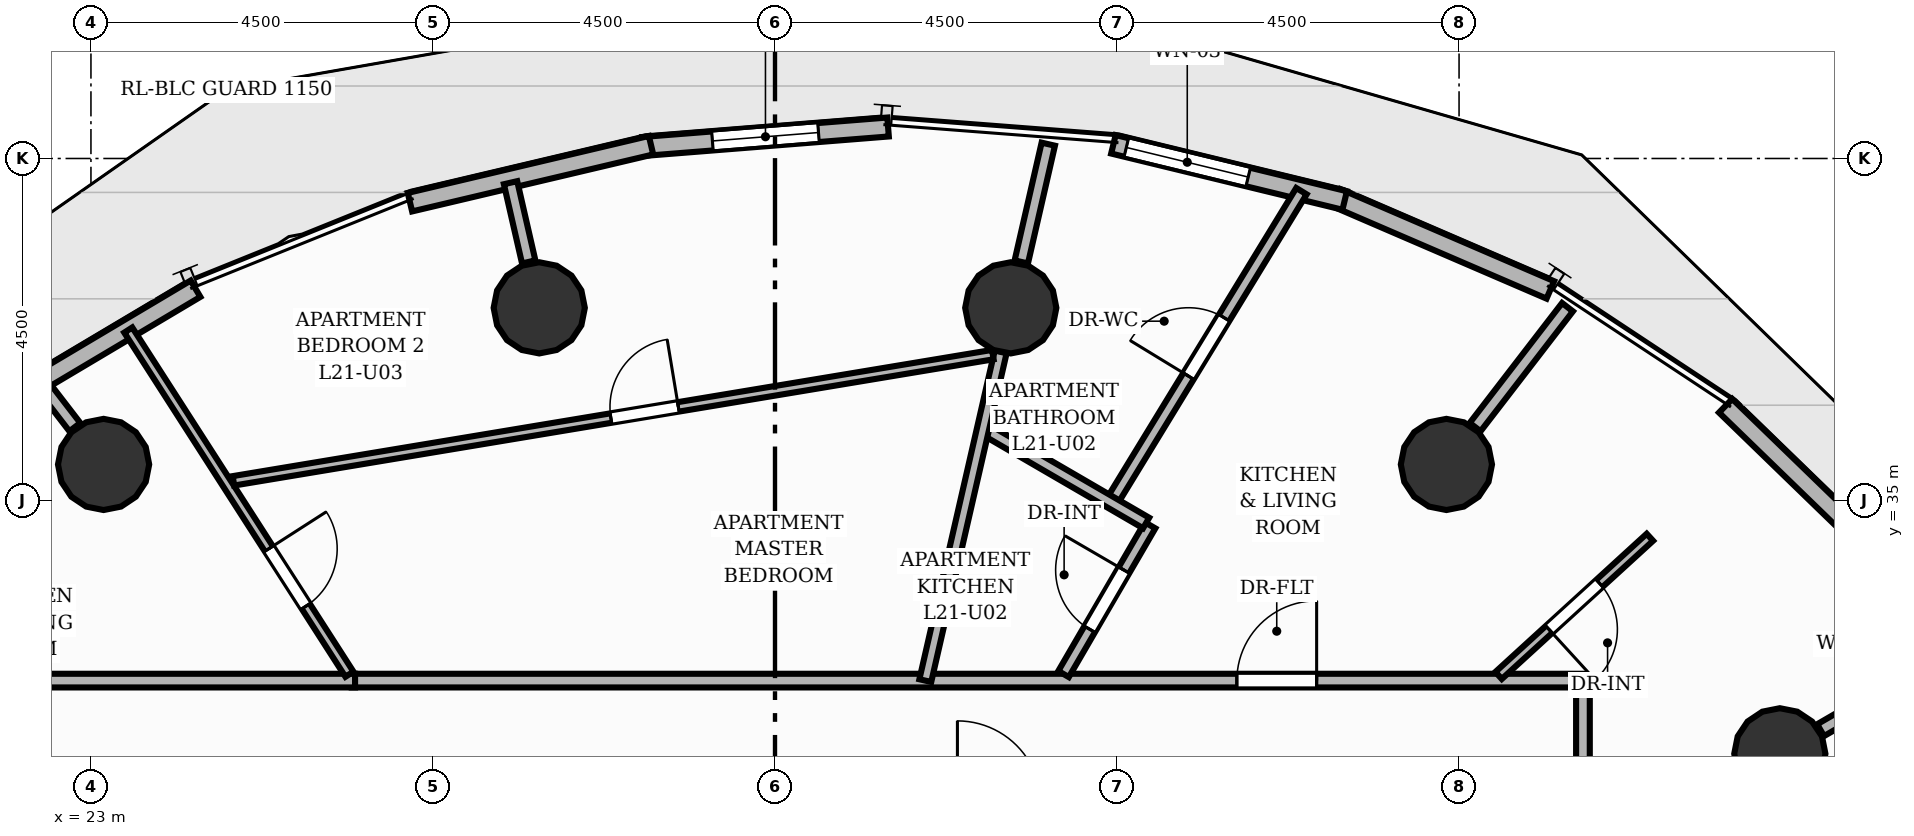
"""IFC4 building model, lengths in metres.
Left out: names, types, materials, properties, quantities, classifications, styles, units other than length and angle.
Written with IfcOpenShell. Run it as: python <this file> out.ifc"""

import sys

from ifc_helpers import new_model, si_unit, direction, frame, frame_2d, origin, origin_2d, place, context, subcontext, project, spatial, rectangle, circle, extrude, element, fill, save


model = new_model("IFC4")
c1 = context("Model", 3, precision=1e-05, world=origin(), true_north=direction((0.0, 1.0)))
c2 = subcontext(c1, "Body", "Model", "MODEL_VIEW")
j1 = project(units=[si_unit("LENGTHUNIT", "METRE"), si_unit("PLANEANGLEUNIT", "RADIAN")], contexts=[c1])
p1 = place(None, origin())
s1 = spatial("IfcSite", under=j1, at=p1, CompositionType="ELEMENT")
p2 = place(p1, origin())
s2 = spatial("IfcBuilding", under=s1, at=p2, CompositionType="ELEMENT")
p3 = place(p2, frame((0.0, 0.0, 74.08)))
s3 = spatial("IfcBuildingStorey", under=s2, at=p3, CompositionType="ELEMENT", Elevation=74.08)
for number, where, z_axis, x_axis in (
    (1, (45.22, 31.667, 0.0), (0.0, 0.0, 1.0), (1.0, 0.0, 0.0)),
    (2, (40.833, 35.474, 0.0), (0.0, 0.0, 1.0), (1.0, 0.0, 0.0)),
    (3, (35.102, 37.535, 0.0), (0.0, 0.0, 1.0), (1.0, 0.0, 0.0)),
    (4, (28.898, 37.535, 0.0), (0.0, 0.0, 1.0), (1.0, 0.0, 0.0)),
    (5, (23.167, 35.474, 0.0), (0.0, 0.0, 1.0), (1.0, 0.0, 0.0)),
):
    element("IfcColumn", number, at=place(p3, frame(where, z_axis=z_axis, x_axis=x_axis)), inside=s3, PredefinedType="COLUMN", context=c2, shape_type="SweptSolid", body=[
        extrude(circle(Radius=0.6, at=origin_2d()), origin(), (0.0, 0.0, 1.0), 3.2),
    ])
p4 = place(p3, frame((44.507, 36.247, 0.0), z_axis=(0.0, 0.0, 1.0), x_axis=(0.717880157086, -0.696166704219, 0.0)))
e6 = element("IfcWall", 6, at=p4, inside=s3, PredefinedType="SOLIDWALL", context=c2, shape_type="SweptSolid", body=[
    extrude(rectangle(XDim=2.923, YDim=0.25, at=frame_2d((1.462, 0.0))), origin(), (0.0, 0.0, 1.0), 2.96),
])
p5 = place(p3, frame((39.39, 38.982, 0.0), z_axis=(0.0, 0.0, 1.0), x_axis=(0.91829708806, -0.395891977766, 0.0)))
e7 = element("IfcWall", 7, at=p5, inside=s3, PredefinedType="SOLIDWALL", context=c2, shape_type="SweptSolid", body=[
    extrude(rectangle(XDim=3.061, YDim=0.25, at=frame_2d((1.53, 0.0))), origin(), (0.0, 0.0, 1.0), 2.96),
])
p6 = place(p3, frame((36.452, 39.687, 0.0), z_axis=(0.0, 0.0, 1.0), x_axis=(0.971748850292, -0.236017312833, 0.0)))
e8 = element("IfcWall", 8, at=p6, inside=s3, PredefinedType="SOLIDWALL", context=c2, shape_type="SweptSolid", body=[
    extrude(rectangle(XDim=3.131, YDim=0.25, at=frame_2d((1.565, 0.0))), origin(), (0.0, 0.0, 1.0), 2.96),
])
p7 = place(p6, frame((0.175, 0.0, 0.85)))
e9 = element("IfcOpeningElement", 9, at=p7, cuts=e8, PredefinedType="OPENING", context=c2, shape_type="SweptSolid", body=[
    extrude(rectangle(XDim=1.65, YDim=1.55, at=frame_2d((0.825, 0.775))), frame((0.0, 0.135, 0.0), z_axis=(0.0, -1.0, 0.0), x_axis=(1.0, 0.0, 0.0)), (0.0, 0.0, 1.0), 0.27),
])
p8 = place(p3, frame((30.262, 39.658, 0.0), z_axis=(0.0, 0.0, 1.0), x_axis=(0.996851873062, 0.079286462736, 0.0)))
e10 = element("IfcWall", 10, at=p8, inside=s3, PredefinedType="SOLIDWALL", context=c2, shape_type="SweptSolid", body=[
    extrude(rectangle(XDim=3.236, YDim=0.25, at=frame_2d((1.618, 0.0))), origin(), (0.0, 0.0, 1.0), 2.96),
])
p9 = place(p8, frame((0.918, 0.0, 0.85)))
e11 = element("IfcOpeningElement", 11, at=p9, cuts=e10, PredefinedType="OPENING", context=c2, shape_type="SweptSolid", body=[
    extrude(rectangle(XDim=1.4, YDim=1.55, at=frame_2d((0.7, 0.775))), frame((0.0, 0.135, 0.0), z_axis=(0.0, -1.0, 0.0), x_axis=(1.0, 0.0, 0.0)), (0.0, 0.0, 1.0), 0.27),
])
p10 = place(p3, frame((27.197, 38.925, 0.0), z_axis=(0.0, 0.0, 1.0), x_axis=(0.973185832187, 0.230020294824, 0.0)))
e12 = element("IfcWall", 12, at=p10, inside=s3, PredefinedType="SOLIDWALL", context=c2, shape_type="SweptSolid", body=[
    extrude(rectangle(XDim=3.26, YDim=0.25, at=frame_2d((1.63, 0.0))), origin(), (0.0, 0.0, 1.0), 2.96),
])
p11 = place(p3, frame((21.594, 36.132, 0.0), z_axis=(0.0, 0.0, 1.0), x_axis=(0.859543053771, 0.511063341196, 0.0)))
e13 = element("IfcWall", 13, at=p11, inside=s3, PredefinedType="SOLIDWALL", context=c2, shape_type="SweptSolid", body=[
    extrude(rectangle(XDim=3.236, YDim=0.25, at=frame_2d((1.618, 0.0))), origin(), (0.0, 0.0, 1.0), 2.96),
])
p12 = place(p3, frame((45.757, 31.978, 0.0), z_axis=(0.0, 0.0, 1.0), x_axis=(0.86503562166, 0.501710447628, 0.0)))
e14 = element("IfcWall", 14, at=p12, inside=s3, PredefinedType="PARTITIONING", context=c2, shape_type="SweptSolid", body=[
    extrude(rectangle(XDim=1.912, YDim=0.18, at=frame_2d((0.956, 0.0))), origin(), (0.0, 0.0, 1.0), 2.26),
])
p13 = place(p3, frame((41.212, 35.966, 0.0), z_axis=(0.0, 0.0, 1.0), x_axis=(0.609995088008, 0.792405194712, 0.0)))
e15 = element("IfcWall", 15, at=p13, inside=s3, PredefinedType="PARTITIONING", context=c2, shape_type="SweptSolid", body=[
    extrude(rectangle(XDim=1.991, YDim=0.18, at=frame_2d((0.996, 0.0))), origin(), (0.0, 0.0, 1.0), 2.26),
])
p14 = place(p3, frame((35.24, 38.139, 0.0), z_axis=(0.0, 0.0, 1.0), x_axis=(0.223333591652, 0.974742071955, 0.0)))
e16 = element("IfcWall", 16, at=p14, inside=s3, PredefinedType="PARTITIONING", context=c2, shape_type="SweptSolid", body=[
    extrude(rectangle(XDim=1.589, YDim=0.18, at=frame_2d((0.795, 0.0))), origin(), (0.0, 0.0, 1.0), 2.26),
])
p15 = place(p3, frame((28.76, 38.139, 0.0), z_axis=(0.0, 0.0, 1.0), x_axis=(-0.223308362472, 0.974747852139, 0.0)))
e17 = element("IfcWall", 17, at=p15, inside=s3, PredefinedType="PARTITIONING", context=c2, shape_type="SweptSolid", body=[
    extrude(rectangle(XDim=1.069, YDim=0.18, at=frame_2d((0.535, 0.0))), origin(), (0.0, 0.0, 1.0), 2.26),
])
p16 = place(p3, frame((22.788, 35.966, 0.0), z_axis=(0.0, 0.0, 1.0), x_axis=(-0.609945476355, 0.792443383387, 0.0)))
e18 = element("IfcWall", 18, at=p16, inside=s3, PredefinedType="PARTITIONING", context=c2, shape_type="SweptSolid", body=[
    extrude(rectangle(XDim=0.704, YDim=0.18, at=frame_2d((0.352, 0.0))), origin(), (0.0, 0.0, 1.0), 2.26),
])
p17 = place(p3, frame((26.431, 32.63, 0.0), z_axis=(0.0, 0.0, 1.0), x_axis=(1.0, 0.0, 0.0)))
e19 = element("IfcWall", 19, at=p17, inside=s3, PredefinedType="PARTITIONING", context=c2, shape_type="SweptSolid", body=[
    extrude(rectangle(XDim=16.199, YDim=0.18, at=frame_2d((8.099, 0.0))), origin(), (0.0, 0.0, 1.0), 2.955),
])
p18 = place(p17, frame((11.645, 0.0, 0.0)))
e20 = element("IfcOpeningElement", 20, at=p18, cuts=e19, PredefinedType="OPENING", context=c2, shape_type="SweptSolid", body=[
    extrude(rectangle(XDim=1.05, YDim=2.15, at=frame_2d((0.525, 1.075))), frame((0.0, 0.1, 0.0), z_axis=(0.0, -1.0, 0.0), x_axis=(1.0, 0.0, 0.0)), (0.0, 0.0, 1.0), 0.2),
])
p19 = place(p3, frame((42.63, 32.63, 0.0), z_axis=(0.0, 0.0, 1.0), x_axis=(0.0, -1.0, 0.0)))
e21 = element("IfcWall", 21, at=p19, inside=s3, PredefinedType="PARTITIONING", context=c2, shape_type="SweptSolid", body=[
    extrude(rectangle(XDim=6.23, YDim=0.18, at=frame_2d((3.115, 0.0))), origin(), (0.0, 0.0, 1.0), 2.955),
])
p20 = place(p3, frame((21.43, 32.63, 0.0), z_axis=(0.0, 0.0, 1.0), x_axis=(1.0, 0.0, 0.0)))
e22 = element("IfcWall", 22, at=p20, inside=s3, PredefinedType="PARTITIONING", context=c2, shape_type="SweptSolid", body=[
    extrude(rectangle(XDim=5.045, YDim=0.18, at=frame_2d((2.522, 0.0))), origin(), (0.0, 0.0, 1.0), 2.955),
])
p21 = place(p3, frame((36.424, 34.971, 0.0), z_axis=(0.0, 0.0, 1.0), x_axis=(0.521036660125, 0.853534298553, 0.0)))
e23 = element("IfcWall", 23, at=p21, inside=s3, PredefinedType="PLUMBINGWALL", context=c2, shape_type="SweptSolid", body=[
    extrude(rectangle(XDim=4.803, YDim=0.16, at=frame_2d((2.401, 0.0))), origin(), (0.0, 0.0, 1.0), 2.641),
])
p22 = place(p21, frame((1.951, 0.0, 0.0)))
e24 = element("IfcOpeningElement", 24, at=p22, cuts=e23, PredefinedType="OPENING", context=c2, shape_type="SweptSolid", body=[
    extrude(rectangle(XDim=0.9, YDim=2.1, at=frame_2d((0.45, 1.05))), frame((0.0, 0.09, 0.0), z_axis=(0.0, -1.0, 0.0), x_axis=(1.0, 0.0, 0.0)), (0.0, 0.0, 1.0), 0.18),
])
p23 = place(p3, frame((43.511, 34.516, 0.0), z_axis=(0.0, 0.0, 1.0), x_axis=(-0.738303163636, -0.674469004896, 0.0)))
e25 = element("IfcWall", 25, at=p23, inside=s3, PredefinedType="PARTITIONING", context=c2, shape_type="SweptSolid", body=[
    extrude(rectangle(XDim=2.696, YDim=0.125, at=frame_2d((1.348, 0.0))), origin(), (0.0, 0.0, 1.0), 2.955),
])
p24 = place(p23, frame((0.898, 0.0, 0.0)))
e26 = element("IfcOpeningElement", 26, at=p24, cuts=e25, PredefinedType="OPENING", context=c2, shape_type="SweptSolid", body=[
    extrude(rectangle(XDim=0.9, YDim=2.1, at=frame_2d((0.45, 1.05))), frame((0.0, 0.073, 0.0), z_axis=(0.0, -1.0, 0.0), x_axis=(1.0, 0.0, 0.0)), (0.0, 0.0, 1.0), 0.145),
])
p25 = place(p3, frame((35.797, 32.716, 0.0), z_axis=(0.0, 0.0, 1.0), x_axis=(0.50256985659, 0.864536603763, 0.0)))
e27 = element("IfcWall", 27, at=p25, inside=s3, PredefinedType="PLUMBINGWALL", context=c2, shape_type="SweptSolid", body=[
    extrude(rectangle(XDim=2.264, YDim=0.16, at=frame_2d((1.132, 0.0))), origin(), (0.0, 0.0, 1.0), 2.955),
])
p26 = place(p25, frame((0.682, 0.0, 0.0)))
e28 = element("IfcOpeningElement", 28, at=p26, cuts=e27, PredefinedType="OPENING", context=c2, shape_type="SweptSolid", body=[
    extrude(rectangle(XDim=0.9, YDim=2.1, at=frame_2d((0.45, 1.05))), frame((0.0, 0.09, 0.0), z_axis=(0.0, -1.0, 0.0), x_axis=(1.0, 0.0, 0.0)), (0.0, 0.0, 1.0), 0.18),
])
p27 = place(p3, frame((36.883, 34.704, 0.0), z_axis=(0.0, 0.0, 1.0), x_axis=(-0.864542002386, 0.502560569594, 0.0)))
e29 = element("IfcWall", 29, at=p27, inside=s3, PredefinedType="PLUMBINGWALL", context=c2, shape_type="SweptSolid", body=[
    extrude(rectangle(XDim=2.48, YDim=0.16, at=frame_2d((1.24, 0.0))), origin(), (0.0, 0.0, 1.0), 2.955),
])
p28 = place(p3, frame((33.978, 32.63, 0.0), z_axis=(0.0, 0.0, 1.0), x_axis=(0.223368533365, 0.974734065426, 0.0)))
e30 = element("IfcWall", 30, at=p28, inside=s3, PredefinedType="PLUMBINGWALL", context=c2, shape_type="SweptSolid", body=[
    extrude(rectangle(XDim=4.438, YDim=0.16, at=frame_2d((2.219, 0.0))), origin(), (0.0, 0.0, 1.0), 2.26),
])
p29 = place(p3, frame((23.491, 37.243, 0.0), z_axis=(0.0, 0.0, 1.0), x_axis=(0.540565030624, -0.841302233247, 0.0)))
e31 = element("IfcWall", 31, at=p29, inside=s3, PredefinedType="PARTITIONING", context=c2, shape_type="SweptSolid", body=[
    extrude(rectangle(XDim=5.383, YDim=0.125, at=frame_2d((2.691, 0.0))), origin(), (0.0, 0.0, 1.0), 2.955),
])
p30 = place(p29, frame((3.42, 0.0, 0.0)))
e32 = element("IfcOpeningElement", 32, at=p30, cuts=e31, PredefinedType="OPENING", context=c2, shape_type="SweptSolid", body=[
    extrude(rectangle(XDim=0.9, YDim=2.1, at=frame_2d((0.45, 1.05))), frame((0.0, 0.073, 0.0), z_axis=(0.0, -1.0, 0.0), x_axis=(1.0, 0.0, 0.0)), (0.0, 0.0, 1.0), 0.145),
])
p31 = place(p3, frame((24.875, 35.259, 0.0), z_axis=(0.0, 0.0, 1.0), x_axis=(0.986466792703, 0.163961174958, 0.0)))
e33 = element("IfcWall", 33, at=p31, inside=s3, PredefinedType="PARTITIONING", context=c2, shape_type="SweptSolid", body=[
    extrude(rectangle(XDim=10.128, YDim=0.125, at=frame_2d((5.064, 0.0))), origin(), (0.0, 0.0, 1.0), 2.955),
])
p32 = place(p31, frame((5.034, 0.0, 0.0)))
e34 = element("IfcOpeningElement", 34, at=p32, cuts=e33, PredefinedType="OPENING", context=c2, shape_type="SweptSolid", body=[
    extrude(rectangle(XDim=0.9, YDim=2.1, at=frame_2d((0.45, 1.05))), frame((0.0, 0.073, 0.0), z_axis=(0.0, -1.0, 0.0), x_axis=(1.0, 0.0, 0.0)), (0.0, 0.0, 1.0), 0.145),
])
p33 = place(p7, origin())
e35 = element("IfcWindow", 35, at=p33, inside=s3, PartitioningType="SINGLE_PANEL", PredefinedType="WINDOW", context=c2, shape_type="SweptSolid", body=[
    extrude(rectangle(XDim=1.65, YDim=1.55, at=frame_2d((0.825, 0.775))), frame((0.0, 0.03, 0.0), z_axis=(0.0, -1.0, 0.0), x_axis=(1.0, 0.0, 0.0)), (0.0, 0.0, 1.0), 0.06),
])
fill(e9, e35)
p34 = place(p9, origin())
e36 = element("IfcWindow", 36, at=p34, inside=s3, PartitioningType="SINGLE_PANEL", PredefinedType="WINDOW", context=c2, shape_type="SweptSolid", body=[
    extrude(rectangle(XDim=1.4, YDim=1.55, at=frame_2d((0.7, 0.775))), frame((0.0, 0.03, 0.0), z_axis=(0.0, -1.0, 0.0), x_axis=(1.0, 0.0, 0.0)), (0.0, 0.0, 1.0), 0.06),
])
fill(e11, e36)
p35 = place(p18, origin())
e37 = element("IfcDoor", 37, at=p35, inside=s3, OperationType="SINGLE_SWING_RIGHT", PredefinedType="DOOR", context=c2, shape_type="SweptSolid", body=[
    extrude(rectangle(XDim=1.05, YDim=2.15, at=frame_2d((0.525, 1.075))), frame((0.0, 0.025, 0.0), z_axis=(0.0, -1.0, 0.0), x_axis=(1.0, 0.0, 0.0)), (0.0, 0.0, 1.0), 0.05),
])
fill(e20, e37)
p36 = place(p22, origin())
e38 = element("IfcDoor", 38, at=p36, inside=s3, OperationType="SINGLE_SWING_LEFT", PredefinedType="DOOR", context=c2, shape_type="SweptSolid", body=[
    extrude(rectangle(XDim=0.9, YDim=2.1, at=frame_2d((0.45, 1.05))), frame((0.0, 0.025, 0.0), z_axis=(0.0, -1.0, 0.0), x_axis=(1.0, 0.0, 0.0)), (0.0, 0.0, 1.0), 0.05),
])
fill(e24, e38)
p37 = place(p24, origin())
e39 = element("IfcDoor", 39, at=p37, inside=s3, OperationType="SINGLE_SWING_RIGHT", PredefinedType="DOOR", context=c2, shape_type="SweptSolid", body=[
    extrude(rectangle(XDim=0.9, YDim=2.1, at=frame_2d((0.45, 1.05))), frame((0.0, 0.025, 0.0), z_axis=(0.0, -1.0, 0.0), x_axis=(1.0, 0.0, 0.0)), (0.0, 0.0, 1.0), 0.05),
])
fill(e26, e39)
p38 = place(p26, origin())
e40 = element("IfcDoor", 40, at=p38, inside=s3, OperationType="SINGLE_SWING_RIGHT", PredefinedType="DOOR", context=c2, shape_type="SweptSolid", body=[
    extrude(rectangle(XDim=0.9, YDim=2.1, at=frame_2d((0.45, 1.05))), frame((0.0, 0.025, 0.0), z_axis=(0.0, -1.0, 0.0), x_axis=(1.0, 0.0, 0.0)), (0.0, 0.0, 1.0), 0.05),
])
fill(e28, e40)
p39 = place(p30, origin())
e41 = element("IfcDoor", 41, at=p39, inside=s3, OperationType="SINGLE_SWING_LEFT", PredefinedType="DOOR", context=c2, shape_type="SweptSolid", body=[
    extrude(rectangle(XDim=0.9, YDim=2.1, at=frame_2d((0.45, 1.05))), frame((0.0, 0.025, 0.0), z_axis=(0.0, -1.0, 0.0), x_axis=(1.0, 0.0, 0.0)), (0.0, 0.0, 1.0), 0.05),
])
fill(e32, e41)
p40 = place(p32, origin())
e42 = element("IfcDoor", 42, at=p40, inside=s3, OperationType="SINGLE_SWING_RIGHT", PredefinedType="DOOR", context=c2, shape_type="SweptSolid", body=[
    extrude(rectangle(XDim=0.9, YDim=2.1, at=frame_2d((0.45, 1.05))), frame((0.0, 0.025, 0.0), z_axis=(0.0, -1.0, 0.0), x_axis=(1.0, 0.0, 0.0)), (0.0, 0.0, 1.0), 0.05),
])
fill(e34, e42)
save(model, sys.argv[1])
